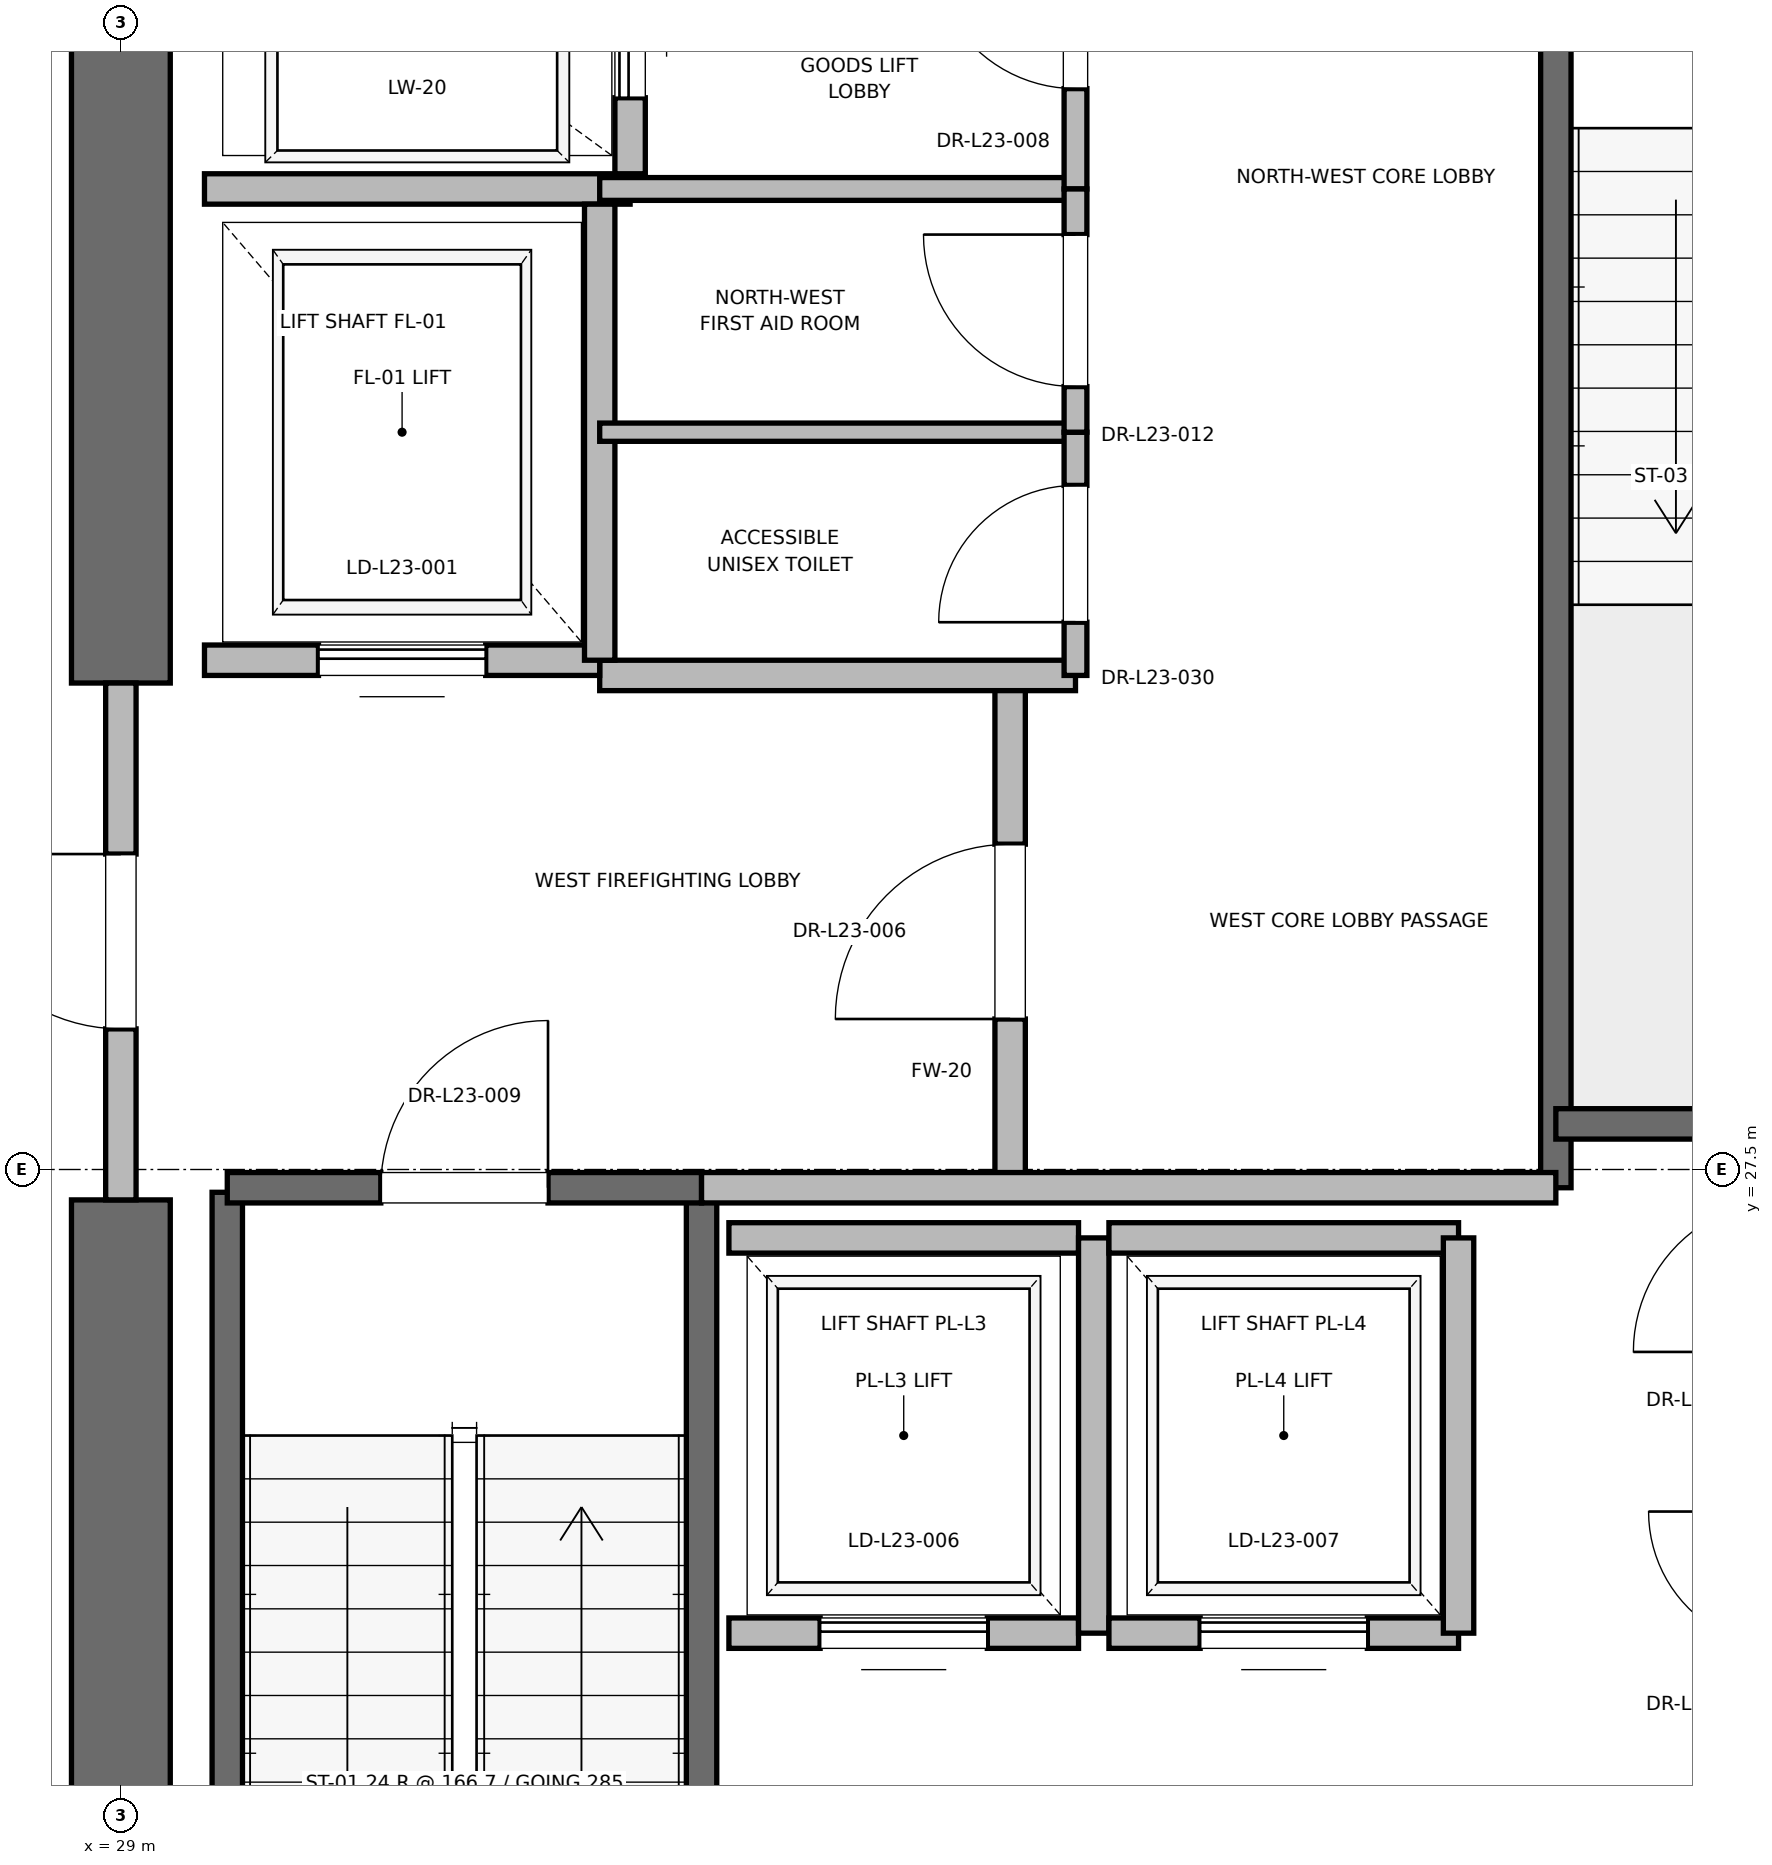
"""IFC4 building model, lengths in metres.
Left out: names, types, materials, properties, quantities, classifications, styles, units other than length and angle.
Written with IfcOpenShell. Run it as: python <this file> out.ifc"""

import sys

from ifc_helpers import new_model, si_unit, direction, frame, frame_2d, origin, place, context, subcontext, project, spatial, rectangle, extrude, element, fill, save


model = new_model("IFC4")
c1 = context("Model", 3, precision=1e-05, world=origin(), true_north=direction((0.0, 1.0)))
c2 = subcontext(c1, "Body", "Model", "MODEL_VIEW")
j1 = project(units=[si_unit("LENGTHUNIT", "METRE"), si_unit("PLANEANGLEUNIT", "RADIAN")], contexts=[c1])
p1 = place(None, origin())
s1 = spatial("IfcSite", under=j1, at=p1, CompositionType="ELEMENT")
p2 = place(p1, origin())
s2 = spatial("IfcBuilding", under=s1, at=p2, CompositionType="ELEMENT")
p3 = place(p2, frame((0.0, 0.0, 99.6)))
s3 = spatial("IfcBuildingStorey", under=s2, at=p3, CompositionType="ELEMENT", Elevation=99.6)
p4 = place(p3, frame((29.0, 18.5, 0.0), z_axis=(0.0, 0.0, 1.0), x_axis=(0.0, 1.0, 0.0)))
e1 = element("IfcWall", 1, at=p4, inside=s3, PredefinedType="SHEAR", context=c2, shape_type="SweptSolid", body=[
    extrude(rectangle(XDim=8.8, YDim=0.65, at=frame_2d((4.4, 0.0))), origin(), (0.0, 0.0, 1.0), 3.76),
])
p5 = place(p3, frame((29.0, 30.7, 0.0), z_axis=(0.0, 0.0, 1.0), x_axis=(0.0, 1.0, 0.0)))
e2 = element("IfcWall", 2, at=p5, inside=s3, PredefinedType="SHEAR", context=c2, shape_type="SweptSolid", body=[
    extrude(rectangle(XDim=5.8, YDim=0.65, at=frame_2d((2.9, 0.0))), origin(), (0.0, 0.0, 1.0), 3.76),
])
p6 = place(p3, frame((29.7, 19.2, 0.0), z_axis=(0.0, 0.0, 1.0), x_axis=(0.0, 1.0, 0.0)))
e3 = element("IfcWall", 3, at=p6, inside=s3, PredefinedType="SOLIDWALL", context=c2, shape_type="SweptSolid", body=[
    extrude(rectangle(XDim=8.15, YDim=0.2, at=frame_2d((4.075, 0.0))), origin(), (0.0, 0.0, 1.0), 3.76),
])
p7 = place(p3, frame((32.82, 18.6, 0.0), z_axis=(0.0, 0.0, 1.0), x_axis=(0.0, 1.0, 0.0)))
e4 = element("IfcWall", 4, at=p7, inside=s3, PredefinedType="SOLIDWALL", context=c2, shape_type="SweptSolid", body=[
    extrude(rectangle(XDim=8.78, YDim=0.2, at=frame_2d((4.39, 0.0))), origin(), (0.0, 0.0, 1.0), 3.76),
])
p8 = place(p3, frame((29.7, 27.38, 0.0), z_axis=(0.0, 0.0, 1.0), x_axis=(1.0, 0.0, 0.0)))
e5 = element("IfcWall", 5, at=p8, inside=s3, PredefinedType="SOLIDWALL", context=c2, shape_type="SweptSolid", body=[
    extrude(rectangle(XDim=3.12, YDim=0.2, at=frame_2d((1.56, 0.0))), origin(), (0.0, 0.0, 1.0), 3.76),
])
p9 = place(p8, frame((1.01, 0.0, 0.0)))
e6 = element("IfcOpeningElement", 6, at=p9, cuts=e5, PredefinedType="OPENING", context=c2, shape_type="SweptSolid", body=[
    extrude(rectangle(XDim=1.1, YDim=2.15, at=frame_2d((0.55, 1.075))), frame((0.0, 0.1, 0.0), z_axis=(0.0, -1.0, 0.0), x_axis=(1.0, 0.0, 0.0)), (0.0, 0.0, 1.0), 0.2),
])
p10 = place(p3, frame((38.44, 27.38, 0.0), z_axis=(0.0, 0.0, 1.0), x_axis=(0.0, 1.0, 0.0)))
e7 = element("IfcWall", 7, at=p10, inside=s3, PredefinedType="SOLIDWALL", context=c2, shape_type="SweptSolid", body=[
    extrude(rectangle(XDim=8.87, YDim=0.2, at=frame_2d((4.435, 0.0))), origin(), (0.0, 0.0, 1.0), 3.76),
])
p11 = place(p3, frame((38.44, 27.8, 0.0), z_axis=(0.0, 0.0, 1.0), x_axis=(1.0, 0.0, 0.0)))
e8 = element("IfcWall", 8, at=p11, inside=s3, PredefinedType="SOLIDWALL", context=c2, shape_type="SweptSolid", body=[
    extrude(rectangle(XDim=3.32, YDim=0.2, at=frame_2d((1.66, 0.0))), origin(), (0.0, 0.0, 1.0), 3.76),
])
p12 = place(p3, frame((34.85, 27.38, 0.0), z_axis=(0.0, 0.0, 1.0), x_axis=(0.0, 1.0, 0.0)))
e9 = element("IfcWall", 9, at=p12, inside=s3, PredefinedType="PARTITIONING", context=c2, shape_type="SweptSolid", body=[
    extrude(rectangle(XDim=3.37, YDim=0.2, at=frame_2d((1.685, 0.0))), origin(), (0.0, 0.0, 1.0), 3.76),
])
p13 = place(p12, frame((1.11, 0.0, 0.0)))
e10 = element("IfcOpeningElement", 10, at=p13, cuts=e9, PredefinedType="OPENING", context=c2, shape_type="SweptSolid", body=[
    extrude(rectangle(XDim=1.15, YDim=2.2, at=frame_2d((0.575, 1.1))), frame((0.0, 0.1, 0.0), z_axis=(0.0, -1.0, 0.0), x_axis=(1.0, 0.0, 0.0)), (0.0, 0.0, 1.0), 0.2),
])
p14 = place(p3, frame((29.0, 27.3, 0.0), z_axis=(0.0, 0.0, 1.0), x_axis=(0.0, 1.0, 0.0)))
e11 = element("IfcWall", 11, at=p14, inside=s3, PredefinedType="PARTITIONING", context=c2, shape_type="SweptSolid", body=[
    extrude(rectangle(XDim=3.4, YDim=0.2, at=frame_2d((1.7, 0.0))), origin(), (0.0, 0.0, 1.0), 2.54),
])
p15 = place(p14, frame((1.125, 0.0, 0.0)))
e12 = element("IfcOpeningElement", 12, at=p15, cuts=e11, PredefinedType="OPENING", context=c2, shape_type="SweptSolid", body=[
    extrude(rectangle(XDim=1.15, YDim=2.2, at=frame_2d((0.575, 1.1))), frame((0.0, 0.1, 0.0), z_axis=(0.0, -1.0, 0.0), x_axis=(1.0, 0.0, 0.0)), (0.0, 0.0, 1.0), 0.2),
])
p16 = place(p3, frame((32.82, 27.38, 0.0), z_axis=(0.0, 0.0, 1.0), x_axis=(1.0, 0.0, 0.0)))
e13 = element("IfcWall", 13, at=p16, inside=s3, PredefinedType="PARTITIONING", context=c2, shape_type="SweptSolid", body=[
    extrude(rectangle(XDim=5.62, YDim=0.2, at=frame_2d((2.81, 0.0))), origin(), (0.0, 0.0, 1.0), 3.76),
])
p17 = place(p3, frame((32.15, 30.75, 0.0), z_axis=(0.0, 0.0, 1.0), x_axis=(1.0, 0.0, 0.0)))
e14 = element("IfcWall", 14, at=p17, inside=s3, PredefinedType="PARTITIONING", context=c2, shape_type="SweptSolid", body=[
    extrude(rectangle(XDim=3.13, YDim=0.2, at=frame_2d((1.565, 0.0))), origin(), (0.0, 0.0, 1.0), 3.76),
])
p18 = place(p3, frame((29.55, 30.85, 0.0), z_axis=(0.0, 0.0, 1.0), x_axis=(1.0, 0.0, 0.0)))
e15 = element("IfcWall", 15, at=p18, inside=s3, PredefinedType="SOLIDWALL", context=c2, shape_type="SweptSolid", body=[
    extrude(rectangle(XDim=2.6, YDim=0.2, at=frame_2d((1.3, 0.0))), origin(), (0.0, 0.0, 1.0), 2.54),
])
p19 = place(p18, frame((0.75, 0.0, 0.0)))
e16 = element("IfcOpeningElement", 16, at=p19, cuts=e15, PredefinedType="OPENING", context=c2, shape_type="SweptSolid", body=[
    extrude(rectangle(XDim=1.1, YDim=2.2, at=frame_2d((0.55, 1.1))), frame((0.0, 0.1, 0.0), z_axis=(0.0, -1.0, 0.0), x_axis=(1.0, 0.0, 0.0)), (0.0, 0.0, 1.0), 0.2),
])
p20 = place(p3, frame((29.55, 33.95, 0.0), z_axis=(0.0, 0.0, 1.0), x_axis=(1.0, 0.0, 0.0)))
e17 = element("IfcWall", 17, at=p20, inside=s3, PredefinedType="SOLIDWALL", context=c2, shape_type="SweptSolid", body=[
    extrude(rectangle(XDim=2.8, YDim=0.2, at=frame_2d((1.4, 0.0))), origin(), (0.0, 0.0, 1.0), 3.76),
])
p21 = place(p3, frame((32.15, 30.85, 0.0), z_axis=(0.0, 0.0, 1.0), x_axis=(0.0, 1.0, 0.0)))
e18 = element("IfcWall", 18, at=p21, inside=s3, PredefinedType="SOLIDWALL", context=c2, shape_type="SweptSolid", body=[
    extrude(rectangle(XDim=3.0, YDim=0.2, at=frame_2d((1.5, 0.0))), origin(), (0.0, 0.0, 1.0), 3.76),
])
p22 = place(p3, frame((32.35, 34.05, 0.0), z_axis=(0.0, 0.0, 1.0), x_axis=(0.0, 1.0, 0.0)))
e19 = element("IfcWall", 19, at=p22, inside=s3, PredefinedType="SOLIDWALL", context=c2, shape_type="SweptSolid", body=[
    extrude(rectangle(XDim=2.1, YDim=0.2, at=frame_2d((1.05, 0.0))), origin(), (0.0, 0.0, 1.0), 3.76),
])
p23 = place(p22, frame((0.5, 0.0, 0.0)))
e20 = element("IfcOpeningElement", 20, at=p23, cuts=e19, PredefinedType="OPENING", context=c2, shape_type="SweptSolid", body=[
    extrude(rectangle(XDim=1.1, YDim=2.2, at=frame_2d((0.55, 1.1))), frame((0.0, 0.1, 0.0), z_axis=(0.0, -1.0, 0.0), x_axis=(1.0, 0.0, 0.0)), (0.0, 0.0, 1.0), 0.2),
])
p24 = place(p3, frame((33.0, 24.45, 0.0), z_axis=(0.0, 0.0, 1.0), x_axis=(1.0, 0.0, 0.0)))
e21 = element("IfcWall", 21, at=p24, inside=s3, PredefinedType="SOLIDWALL", context=c2, shape_type="SweptSolid", body=[
    extrude(rectangle(XDim=2.3, YDim=0.2, at=frame_2d((1.15, 0.0))), origin(), (0.0, 0.0, 1.0), 3.76),
])
p25 = place(p24, frame((0.6, 0.0, 0.0)))
e22 = element("IfcOpeningElement", 22, at=p25, cuts=e21, PredefinedType="OPENING", context=c2, shape_type="SweptSolid", body=[
    extrude(rectangle(XDim=1.1, YDim=2.2, at=frame_2d((0.55, 1.1))), frame((0.0, 0.1, 0.0), z_axis=(0.0, -1.0, 0.0), x_axis=(1.0, 0.0, 0.0)), (0.0, 0.0, 1.0), 0.2),
])
p26 = place(p3, frame((35.3, 27.05, 0.0), z_axis=(0.0, 0.0, 1.0), x_axis=(-1.0, 0.0, 0.0)))
e23 = element("IfcWall", 23, at=p26, inside=s3, PredefinedType="SOLIDWALL", context=c2, shape_type="SweptSolid", body=[
    extrude(rectangle(XDim=2.3, YDim=0.2, at=frame_2d((1.15, 0.0))), origin(), (0.0, 0.0, 1.0), 3.76),
])
p27 = place(p3, frame((35.4, 24.45, 0.0), z_axis=(0.0, 0.0, 1.0), x_axis=(0.0, 1.0, 0.0)))
e24 = element("IfcWall", 24, at=p27, inside=s3, PredefinedType="SOLIDWALL", context=c2, shape_type="SweptSolid", body=[
    extrude(rectangle(XDim=2.6, YDim=0.2, at=frame_2d((1.3, 0.0))), origin(), (0.0, 0.0, 1.0), 3.76),
])
p28 = place(p3, frame((35.5, 24.45, 0.0), z_axis=(0.0, 0.0, 1.0), x_axis=(1.0, 0.0, 0.0)))
e25 = element("IfcWall", 25, at=p28, inside=s3, PredefinedType="SOLIDWALL", context=c2, shape_type="SweptSolid", body=[
    extrude(rectangle(XDim=2.3, YDim=0.2, at=frame_2d((1.15, 0.0))), origin(), (0.0, 0.0, 1.0), 3.76),
])
p29 = place(p28, frame((0.6, 0.0, 0.0)))
e26 = element("IfcOpeningElement", 26, at=p29, cuts=e25, PredefinedType="OPENING", context=c2, shape_type="SweptSolid", body=[
    extrude(rectangle(XDim=1.1, YDim=2.2, at=frame_2d((0.55, 1.1))), frame((0.0, 0.1, 0.0), z_axis=(0.0, -1.0, 0.0), x_axis=(1.0, 0.0, 0.0)), (0.0, 0.0, 1.0), 0.2),
])
p30 = place(p3, frame((37.8, 27.05, 0.0), z_axis=(0.0, 0.0, 1.0), x_axis=(-1.0, 0.0, 0.0)))
e27 = element("IfcWall", 27, at=p30, inside=s3, PredefinedType="SOLIDWALL", context=c2, shape_type="SweptSolid", body=[
    extrude(rectangle(XDim=2.3, YDim=0.2, at=frame_2d((1.15, 0.0))), origin(), (0.0, 0.0, 1.0), 3.76),
])
p31 = place(p3, frame((37.8, 24.45, 0.0), z_axis=(0.0, 0.0, 1.0), x_axis=(0.0, 1.0, 0.0)))
e28 = element("IfcWall", 28, at=p31, inside=s3, PredefinedType="SOLIDWALL", context=c2, shape_type="SweptSolid", body=[
    extrude(rectangle(XDim=2.6, YDim=0.2, at=frame_2d((1.3, 0.0))), origin(), (0.0, 0.0, 1.0), 3.76),
])
p32 = place(p3, frame((32.15, 33.95, 0.0), z_axis=(0.0, 0.0, 1.0), x_axis=(1.0, 0.0, 0.0)))
e29 = element("IfcWall", 29, at=p32, inside=s3, PredefinedType="PARTITIONING", context=c2, shape_type="SweptSolid", body=[
    extrude(rectangle(XDim=3.13, YDim=0.15, at=frame_2d((1.565, 0.0))), origin(), (0.0, 0.0, 1.0), 2.85),
])
p33 = place(p3, frame((35.28, 33.95, 0.0), z_axis=(0.0, 0.0, 1.0), x_axis=(0.0, 1.0, 0.0)))
e30 = element("IfcWall", 30, at=p33, inside=s3, PredefinedType="PARTITIONING", context=c2, shape_type="SweptSolid", body=[
    extrude(rectangle(XDim=2.27, YDim=0.15, at=frame_2d((1.135, 0.0))), origin(), (0.0, 0.0, 1.0), 2.54),
])
p34 = place(p33, frame((0.66, 0.0, 0.0)))
e31 = element("IfcOpeningElement", 31, at=p34, cuts=e30, PredefinedType="OPENING", context=c2, shape_type="SweptSolid", body=[
    extrude(rectangle(XDim=0.95, YDim=2.15, at=frame_2d((0.475, 1.075))), frame((0.0, 0.075, 0.0), z_axis=(0.0, -1.0, 0.0), x_axis=(1.0, 0.0, 0.0)), (0.0, 0.0, 1.0), 0.15),
])
p35 = place(p3, frame((32.15, 32.35, 0.0), z_axis=(0.0, 0.0, 1.0), x_axis=(1.0, 0.0, 0.0)))
e32 = element("IfcWall", 32, at=p35, inside=s3, PredefinedType="PARTITIONING", context=c2, shape_type="SweptSolid", body=[
    extrude(rectangle(XDim=3.13, YDim=0.12, at=frame_2d((1.565, 0.0))), origin(), (0.0, 0.0, 1.0), 2.85),
])
p36 = place(p3, frame((35.28, 30.75, 0.0), z_axis=(0.0, 0.0, 1.0), x_axis=(0.0, 1.0, 0.0)))
e33 = element("IfcWall", 33, at=p36, inside=s3, PredefinedType="PARTITIONING", context=c2, shape_type="SweptSolid", body=[
    extrude(rectangle(XDim=1.6, YDim=0.15, at=frame_2d((0.8, 0.0))), origin(), (0.0, 0.0, 1.0), 2.85),
])
p37 = place(p36, frame((0.35, 0.0, 0.0)))
e34 = element("IfcOpeningElement", 34, at=p37, cuts=e33, PredefinedType="OPENING", context=c2, shape_type="SweptSolid", body=[
    extrude(rectangle(XDim=0.9, YDim=2.1, at=frame_2d((0.45, 1.05))), frame((0.0, 0.075, 0.0), z_axis=(0.0, -1.0, 0.0), x_axis=(1.0, 0.0, 0.0)), (0.0, 0.0, 1.0), 0.15),
])
p38 = place(p3, frame((35.28, 32.35, 0.0), z_axis=(0.0, 0.0, 1.0), x_axis=(0.0, 1.0, 0.0)))
e35 = element("IfcWall", 35, at=p38, inside=s3, PredefinedType="PARTITIONING", context=c2, shape_type="SweptSolid", body=[
    extrude(rectangle(XDim=1.6, YDim=0.15, at=frame_2d((0.8, 0.0))), origin(), (0.0, 0.0, 1.0), 2.85),
])
p39 = place(p38, frame((0.3, 0.0, 0.0)))
e36 = element("IfcOpeningElement", 36, at=p39, cuts=e35, PredefinedType="OPENING", context=c2, shape_type="SweptSolid", body=[
    extrude(rectangle(XDim=1.0, YDim=2.15, at=frame_2d((0.5, 1.075))), frame((0.0, 0.075, 0.0), z_axis=(0.0, -1.0, 0.0), x_axis=(1.0, 0.0, 0.0)), (0.0, 0.0, 1.0), 0.15),
])
p40 = place(p9, origin())
e37 = element("IfcDoor", 37, at=p40, inside=s3, OperationType="SINGLE_SWING_RIGHT", PredefinedType="DOOR", context=c2, shape_type="SweptSolid", body=[
    extrude(rectangle(XDim=1.1, YDim=2.15, at=frame_2d((0.55, 1.075))), frame((0.0, 0.025, 0.0), z_axis=(0.0, -1.0, 0.0), x_axis=(1.0, 0.0, 0.0)), (0.0, 0.0, 1.0), 0.05),
])
fill(e6, e37)
p41 = place(p13, origin())
e38 = element("IfcDoor", 38, at=p41, inside=s3, OperationType="SINGLE_SWING_LEFT", PredefinedType="DOOR", context=c2, shape_type="SweptSolid", body=[
    extrude(rectangle(XDim=1.15, YDim=2.2, at=frame_2d((0.575, 1.1))), frame((0.0, 0.025, 0.0), z_axis=(0.0, -1.0, 0.0), x_axis=(1.0, 0.0, 0.0)), (0.0, 0.0, 1.0), 0.05),
])
fill(e10, e38)
p42 = place(p15, origin())
e39 = element("IfcDoor", 39, at=p42, inside=s3, OperationType="SINGLE_SWING_RIGHT", PredefinedType="DOOR", context=c2, shape_type="SweptSolid", body=[
    extrude(rectangle(XDim=1.15, YDim=2.2, at=frame_2d((0.575, 1.1))), frame((0.0, 0.025, 0.0), z_axis=(0.0, -1.0, 0.0), x_axis=(1.0, 0.0, 0.0)), (0.0, 0.0, 1.0), 0.05),
])
fill(e12, e39)
p43 = place(p19, origin())
e40 = element("IfcDoor", 40, at=p43, inside=s3, OperationType="SLIDING_TO_RIGHT", PredefinedType="DOOR", context=c2, shape_type="SweptSolid", body=[
    extrude(rectangle(XDim=1.1, YDim=2.2, at=frame_2d((0.55, 1.1))), frame((0.0, 0.025, 0.0), z_axis=(0.0, -1.0, 0.0), x_axis=(1.0, 0.0, 0.0)), (0.0, 0.0, 1.0), 0.05),
])
fill(e16, e40)
p44 = place(p23, origin())
e41 = element("IfcDoor", 41, at=p44, inside=s3, OperationType="SLIDING_TO_RIGHT", PredefinedType="DOOR", context=c2, shape_type="SweptSolid", body=[
    extrude(rectangle(XDim=1.1, YDim=2.2, at=frame_2d((0.55, 1.1))), frame((0.0, 0.025, 0.0), z_axis=(0.0, -1.0, 0.0), x_axis=(1.0, 0.0, 0.0)), (0.0, 0.0, 1.0), 0.05),
])
fill(e20, e41)
p45 = place(p25, origin())
e42 = element("IfcDoor", 42, at=p45, inside=s3, OperationType="SLIDING_TO_RIGHT", PredefinedType="DOOR", context=c2, shape_type="SweptSolid", body=[
    extrude(rectangle(XDim=1.1, YDim=2.2, at=frame_2d((0.55, 1.1))), frame((0.0, 0.025, 0.0), z_axis=(0.0, -1.0, 0.0), x_axis=(1.0, 0.0, 0.0)), (0.0, 0.0, 1.0), 0.05),
])
fill(e22, e42)
p46 = place(p29, origin())
e43 = element("IfcDoor", 43, at=p46, inside=s3, OperationType="SLIDING_TO_RIGHT", PredefinedType="DOOR", context=c2, shape_type="SweptSolid", body=[
    extrude(rectangle(XDim=1.1, YDim=2.2, at=frame_2d((0.55, 1.1))), frame((0.0, 0.025, 0.0), z_axis=(0.0, -1.0, 0.0), x_axis=(1.0, 0.0, 0.0)), (0.0, 0.0, 1.0), 0.05),
])
fill(e26, e43)
p47 = place(p34, origin())
e44 = element("IfcDoor", 44, at=p47, inside=s3, OperationType="SINGLE_SWING_RIGHT", PredefinedType="DOOR", context=c2, shape_type="SweptSolid", body=[
    extrude(rectangle(XDim=0.95, YDim=2.15, at=frame_2d((0.475, 1.075))), frame((0.0, 0.025, 0.0), z_axis=(0.0, -1.0, 0.0), x_axis=(1.0, 0.0, 0.0)), (0.0, 0.0, 1.0), 0.05),
])
fill(e31, e44)
p48 = place(p37, origin())
e45 = element("IfcDoor", 45, at=p48, inside=s3, OperationType="SINGLE_SWING_LEFT", PredefinedType="DOOR", context=c2, shape_type="SweptSolid", body=[
    extrude(rectangle(XDim=0.9, YDim=2.1, at=frame_2d((0.45, 1.05))), frame((0.0, 0.025, 0.0), z_axis=(0.0, -1.0, 0.0), x_axis=(1.0, 0.0, 0.0)), (0.0, 0.0, 1.0), 0.05),
])
fill(e34, e45)
p49 = place(p39, origin())
e46 = element("IfcDoor", 46, at=p49, inside=s3, OperationType="SINGLE_SWING_RIGHT", PredefinedType="DOOR", context=c2, shape_type="SweptSolid", body=[
    extrude(rectangle(XDim=1.0, YDim=2.15, at=frame_2d((0.5, 1.075))), frame((0.0, 0.025, 0.0), z_axis=(0.0, -1.0, 0.0), x_axis=(1.0, 0.0, 0.0)), (0.0, 0.0, 1.0), 0.05),
])
fill(e36, e46)
save(model, sys.argv[1])
